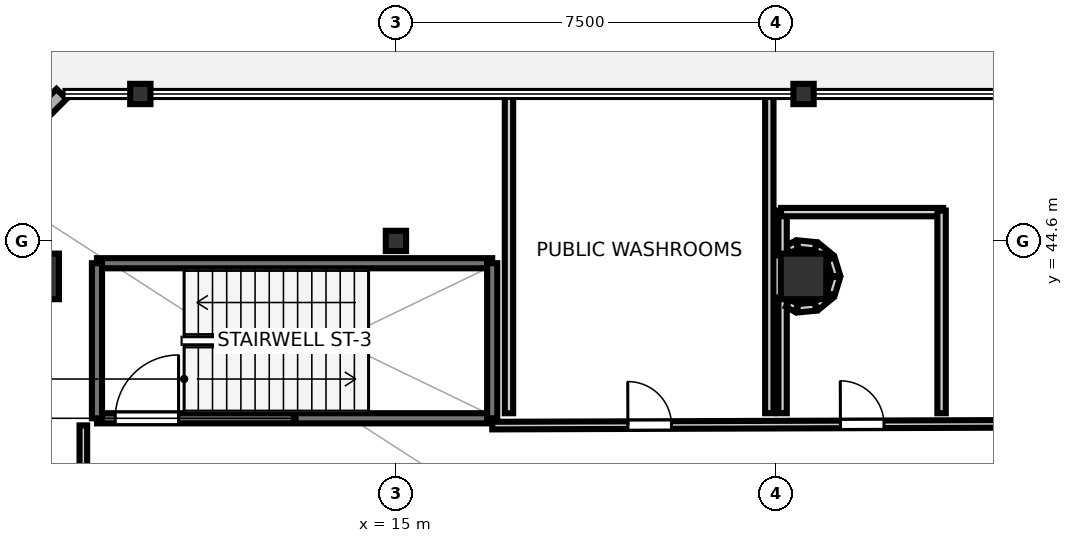
"""IFC4 building model, lengths in metres.
Left out: names, types, materials, properties, quantities, classifications, styles, units other than length and angle.
Written with IfcOpenShell. Run it as: python <this file> out.ifc"""

import sys

from ifc_helpers import new_model, si_unit, direction, frame, frame_2d, origin, origin_2d, place, context, subcontext, project, spatial, rectangle, i_section, extrude, element, fill, save


model = new_model("IFC4")
c1 = context("Model", 3, precision=1e-05, world=origin(), true_north=direction((0.0, 1.0)))
c2 = subcontext(c1, "Body", "Model", "MODEL_VIEW")
j1 = project(units=[si_unit("LENGTHUNIT", "METRE"), si_unit("PLANEANGLEUNIT", "RADIAN")], contexts=[c1])
p1 = place(None, origin())
s1 = spatial("IfcSite", under=j1, at=p1, CompositionType="ELEMENT")
p2 = place(p1, origin())
s2 = spatial("IfcBuilding", under=s1, at=p2, CompositionType="ELEMENT")
p3 = place(p2, frame((0.0, 0.0, 15.8)))
s3 = spatial("IfcBuildingStorey", under=s2, at=p3, CompositionType="ELEMENT", Elevation=15.8)
for number, where, z_axis, x_axis in (
    (1, (7.9, 43.9, 0.0), (0.0, 0.0, 1.0), (1.0, 0.0, 0.0)),
    (2, (23.045, 43.9, 0.0), (0.0, 0.0, 1.0), (1.0, 0.0, 0.0)),
):
    element("IfcColumn", number, at=place(p3, frame(where, z_axis=z_axis, x_axis=x_axis)), inside=s3, PredefinedType="COLUMN", context=c2, shape_type="SweptSolid", body=[
        extrude(rectangle(XDim=0.9, YDim=0.9, at=origin_2d()), origin(), (0.0, 0.0, 1.0), 4.8),
    ])
p4 = place(p3, frame((15.0, 44.6, 0.0), z_axis=(0.0, 0.0, 1.0), x_axis=(1.0, 0.0, 0.0)))
e3 = element("IfcColumn", 3, at=p4, inside=s3, PredefinedType="COLUMN", context=c2, shape_type="SweptSolid", body=[
    extrude(i_section(OverallWidth=0.4, OverallDepth=0.4, WebThickness=0.013, FlangeThickness=0.021, at=origin_2d()), origin(), (0.0, 0.0, 1.0), 4.8),
])
for number, where, z_axis, x_axis in (
    (4, (9.955, 47.5, -0.27), (0.0, 0.0, 1.0), (1.0, 0.0, 0.0)),
    (5, (23.045, 47.5, -0.27), (0.0, 0.0, 1.0), (1.0, 0.0, 0.0)),
):
    element("IfcColumn", number, at=place(p3, frame(where, z_axis=z_axis, x_axis=x_axis)), inside=s3, PredefinedType="COLUMN", context=c2, shape_type="SweptSolid", body=[
        extrude(i_section(OverallWidth=0.4, OverallDepth=0.4, WebThickness=0.013, FlangeThickness=0.021, at=origin_2d()), origin(), (0.0, 0.0, 1.0), 5.07),
    ])
p5 = place(p3, frame((8.4, 47.5, 0.0), z_axis=(0.0, 0.0, 1.0), x_axis=(-0.707106781187, -0.707106781187, 0.0)))
e6 = element("IfcWall", 6, at=p5, inside=s3, PredefinedType="SOLIDWALL", context=c2, shape_type="SweptSolid", body=[
    extrude(rectangle(XDim=5.94, YDim=0.28, at=frame_2d((2.97, 0.0))), origin(), (0.0, 0.0, 1.0), 4.5),
])
p6 = place(p5, frame((2.07, 0.0, 0.0)))
e7 = element("IfcOpeningElement", 7, at=p6, cuts=e6, PredefinedType="OPENING", context=c2, shape_type="SweptSolid", body=[
    extrude(rectangle(XDim=1.8, YDim=2.2, at=frame_2d((0.9, 1.1))), frame((0.0, 0.15, 0.0), z_axis=(0.0, -1.0, 0.0), x_axis=(1.0, 0.0, 0.0)), (0.0, 0.0, 1.0), 0.3),
])
p7 = place(p3, frame((9.1, 41.1, 0.0), z_axis=(0.0, 0.0, 1.0), x_axis=(1.0, 0.0, 0.0)))
e8 = element("IfcWall", 8, at=p7, inside=s3, PredefinedType="SOLIDWALL", context=c2, shape_type="SweptSolid", body=[
    extrude(rectangle(XDim=7.8, YDim=0.2, at=frame_2d((3.9, 0.0))), origin(), (0.0, 0.0, 1.0), 4.5),
])
p8 = place(p7, frame((0.36, 0.0, 0.0)))
e9 = element("IfcOpeningElement", 9, at=p8, cuts=e8, PredefinedType="OPENING", context=c2, shape_type="SweptSolid", body=[
    extrude(rectangle(XDim=1.25, YDim=2.15, at=frame_2d((0.625, 1.075))), frame((0.0, 0.11, 0.0), z_axis=(0.0, -1.0, 0.0), x_axis=(1.0, 0.0, 0.0)), (0.0, 0.0, 1.0), 0.22),
])
p9 = place(p3, frame((9.1, 44.16, 0.0), z_axis=(0.0, 0.0, 1.0), x_axis=(1.0, 0.0, 0.0)))
e10 = element("IfcWall", 10, at=p9, inside=s3, PredefinedType="SOLIDWALL", context=c2, shape_type="SweptSolid", body=[
    extrude(rectangle(XDim=7.8, YDim=0.2, at=frame_2d((3.9, 0.0))), origin(), (0.0, 0.0, 1.0), 4.5),
])
for number, where, z_axis, x_axis in (
    (11, (9.1, 41.1, 0.0), (0.0, 0.0, 1.0), (0.0, 1.0, 0.0)),
    (12, (16.9, 41.1, 0.0), (0.0, 0.0, 1.0), (0.0, 1.0, 0.0)),
):
    element("IfcWall", number, at=place(p3, frame(where, z_axis=z_axis, x_axis=x_axis)), inside=s3, PredefinedType="SOLIDWALL", context=c2, shape_type="SweptSolid", body=[
        extrude(rectangle(XDim=3.06, YDim=0.2, at=frame_2d((1.53, 0.0))), origin(), (0.0, 0.0, 1.0), 4.5),
    ])
p10 = place(p3, frame((8.831, 37.8, 0.0), z_axis=(0.0, 0.0, 1.0), x_axis=(0.0, 1.0, 0.0)))
e13 = element("IfcWall", 13, at=p10, inside=s3, PredefinedType="PARTITIONING", context=c2, shape_type="SweptSolid", body=[
    extrude(rectangle(XDim=3.16, YDim=0.15, at=frame_2d((1.58, 0.0))), origin(), (0.0, 0.0, 1.0), 3.02),
])
p11 = place(p3, frame((16.9, 40.956, 0.0), z_axis=(0.0, 0.0, 1.0), x_axis=(0.999994432489, 0.003336913407, 0.0)))
e14 = element("IfcWall", 14, at=p11, inside=s3, PredefinedType="PARTITIONING", context=c2, shape_type="SweptSolid", body=[
    extrude(rectangle(XDim=9.95, YDim=0.15, at=frame_2d((4.975, 0.0))), origin(), (0.0, 0.0, 1.0), 3.02),
])
p12 = place(p11, frame((6.873, 0.0, 0.0)))
e15 = element("IfcOpeningElement", 15, at=p12, cuts=e14, PredefinedType="OPENING", context=c2, shape_type="SweptSolid", body=[
    extrude(rectangle(XDim=0.86, YDim=2.05, at=frame_2d((0.43, 1.025))), frame((0.0, 0.085, 0.0), z_axis=(0.0, -1.0, 0.0), x_axis=(1.0, 0.0, 0.0)), (0.0, 0.0, 1.0), 0.17),
])
p13 = place(p11, frame((2.678, 0.0, 0.0)))
e16 = element("IfcOpeningElement", 16, at=p13, cuts=e14, PredefinedType="OPENING", context=c2, shape_type="SweptSolid", body=[
    extrude(rectangle(XDim=0.86, YDim=2.05, at=frame_2d((0.43, 1.025))), frame((0.0, 0.085, 0.0), z_axis=(0.0, -1.0, 0.0), x_axis=(1.0, 0.0, 0.0)), (0.0, 0.0, 1.0), 0.17),
])
p14 = place(p3, frame((22.631, 41.2, 0.0), z_axis=(0.0, 0.0, 1.0), x_axis=(0.0, 1.0, 0.0)))
e17 = element("IfcWall", 17, at=p14, inside=s3, PredefinedType="PLUMBINGWALL", context=c2, shape_type="SweptSolid", body=[
    extrude(rectangle(XDim=2.285, YDim=0.165, at=frame_2d((1.143, 0.0))), origin(), (0.0, 0.0, 1.0), 3.02),
])
p15 = place(p3, frame((22.739, 43.371, 0.0), z_axis=(0.0, 0.0, 1.0), x_axis=(0.871509219389, -0.490379119172, 0.0)))
e18 = element("IfcWall", 18, at=p15, inside=s3, PredefinedType="PLUMBINGWALL", context=c2, shape_type="SweptSolid", body=[
    extrude(rectangle(XDim=0.197, YDim=0.165, at=frame_2d((0.098, 0.0))), origin(), (0.0, 0.0, 1.0), 3.02),
])
p16 = place(p3, frame((22.929, 43.271, 0.0), z_axis=(0.0, 0.0, 1.0), x_axis=(0.995193004206, 0.097933060705, 0.0)))
e19 = element("IfcWall", 19, at=p16, inside=s3, PredefinedType="PLUMBINGWALL", context=c2, shape_type="SweptSolid", body=[
    extrude(rectangle(XDim=0.354, YDim=0.165, at=frame_2d((0.177, 0.0))), origin(), (0.0, 0.0, 1.0), 3.02),
])
for number, where, z_axis, x_axis in (
    (20, (23.298, 43.312, 0.0), (0.0, 0.0, 1.0), (0.773, 0.634, 0.0)),
    (21, (23.582, 43.552, 0.0), (0.0, 0.0, 1.0), (0.29, 0.957, 0.0)),
):
    element("IfcWall", number, at=place(p3, frame(where, z_axis=z_axis, x_axis=x_axis)), inside=s3, PredefinedType="PLUMBINGWALL", context=c2, shape_type="SweptSolid", body=[
        extrude(rectangle(XDim=0.354, YDim=0.165, at=frame_2d((0.177, 0.0))), origin(), (0.0, 0.0, 1.0), 3.02),
    ])
p17 = place(p3, frame((23.684, 43.909, 0.0), z_axis=(0.0, 0.0, 1.0), x_axis=(-0.290256142171, 0.956948991291, 0.0)))
e22 = element("IfcWall", 22, at=p17, inside=s3, PredefinedType="PLUMBINGWALL", context=c2, shape_type="SweptSolid", body=[
    extrude(rectangle(XDim=0.354, YDim=0.165, at=frame_2d((0.177, 0.0))), origin(), (0.0, 0.0, 1.0), 3.02),
])
p18 = place(p3, frame((23.572, 44.263, 0.0), z_axis=(0.0, 0.0, 1.0), x_axis=(-0.773281307259, 0.634063103992, 0.0)))
e23 = element("IfcWall", 23, at=p18, inside=s3, PredefinedType="PLUMBINGWALL", context=c2, shape_type="SweptSolid", body=[
    extrude(rectangle(XDim=0.354, YDim=0.165, at=frame_2d((0.177, 0.0))), origin(), (0.0, 0.0, 1.0), 3.02),
])
p19 = place(p3, frame((23.281, 44.494, 0.0), z_axis=(0.0, 0.0, 1.0), x_axis=(-0.995193004206, 0.097933060705, 0.0)))
e24 = element("IfcWall", 24, at=p19, inside=s3, PredefinedType="PLUMBINGWALL", context=c2, shape_type="SweptSolid", body=[
    extrude(rectangle(XDim=0.354, YDim=0.165, at=frame_2d((0.177, 0.0))), origin(), (0.0, 0.0, 1.0), 3.02),
])
p20 = place(p3, frame((22.91, 44.525, 0.0), z_axis=(0.0, 0.0, 1.0), x_axis=(-0.871509219389, -0.490379119172, 0.0)))
e25 = element("IfcWall", 25, at=p20, inside=s3, PredefinedType="PLUMBINGWALL", context=c2, shape_type="SweptSolid", body=[
    extrude(rectangle(XDim=0.197, YDim=0.165, at=frame_2d((0.098, 0.0))), origin(), (0.0, 0.0, 1.0), 3.02),
])
p21 = place(p3, frame((22.631, 44.315, 0.0), z_axis=(0.0, 0.0, 1.0), x_axis=(0.0, 1.0, 0.0)))
e26 = element("IfcWall", 26, at=p21, inside=s3, PredefinedType="PLUMBINGWALL", context=c2, shape_type="SweptSolid", body=[
    extrude(rectangle(XDim=0.885, YDim=0.165, at=frame_2d((0.442, 0.0))), origin(), (0.0, 0.0, 1.0), 3.02),
])
p22 = place(p3, frame((22.6, 45.169, 0.0), z_axis=(0.0, 0.0, 1.0), x_axis=(1.0, 0.0, 0.0)))
e27 = element("IfcWall", 27, at=p22, inside=s3, PredefinedType="PLUMBINGWALL", context=c2, shape_type="SweptSolid", body=[
    extrude(rectangle(XDim=3.2, YDim=0.165, at=frame_2d((1.6, 0.0))), origin(), (0.0, 0.0, 1.0), 3.02),
])
p23 = place(p3, frame((25.769, 45.2, 0.0), z_axis=(0.0, 0.0, 1.0), x_axis=(0.0, -1.0, 0.0)))
e28 = element("IfcWall", 28, at=p23, inside=s3, PredefinedType="PLUMBINGWALL", context=c2, shape_type="SweptSolid", body=[
    extrude(rectangle(XDim=4.0, YDim=0.165, at=frame_2d((2.0, 0.0))), origin(), (0.0, 0.0, 1.0), 3.02),
])
for number, where, z_axis, x_axis in (
    (29, (22.369, 47.52, 0.0), (0.0, 0.0, 1.0), (0.0, -1.0, 0.0)),
    (30, (17.231, 41.2, 0.0), (0.0, 0.0, 1.0), (0.0, 1.0, 0.0)),
):
    element("IfcWall", number, at=place(p3, frame(where, z_axis=z_axis, x_axis=x_axis)), inside=s3, PredefinedType="PLUMBINGWALL", context=c2, shape_type="SweptSolid", body=[
        extrude(rectangle(XDim=6.32, YDim=0.165, at=frame_2d((3.16, 0.0))), origin(), (0.0, 0.0, 1.0), 3.02),
    ])
p24 = place(p8, origin())
e31 = element("IfcDoor", 31, at=p24, inside=s3, OperationType="SINGLE_SWING_RIGHT", PredefinedType="DOOR", context=c2, shape_type="SweptSolid", body=[
    extrude(rectangle(XDim=1.25, YDim=2.15, at=frame_2d((0.625, 1.075))), frame((0.0, 0.025, 0.0), z_axis=(0.0, -1.0, 0.0), x_axis=(1.0, 0.0, 0.0)), (0.0, 0.0, 1.0), 0.05),
])
fill(e9, e31)
p25 = place(p12, origin())
e32 = element("IfcDoor", 32, at=p25, inside=s3, OperationType="SINGLE_SWING_LEFT", PredefinedType="DOOR", context=c2, shape_type="SweptSolid", body=[
    extrude(rectangle(XDim=0.86, YDim=2.05, at=frame_2d((0.43, 1.025))), frame((0.0, 0.025, 0.0), z_axis=(0.0, -1.0, 0.0), x_axis=(1.0, 0.0, 0.0)), (0.0, 0.0, 1.0), 0.05),
])
fill(e15, e32)
p26 = place(p13, origin())
e33 = element("IfcDoor", 33, at=p26, inside=s3, OperationType="SINGLE_SWING_LEFT", PredefinedType="DOOR", context=c2, shape_type="SweptSolid", body=[
    extrude(rectangle(XDim=0.86, YDim=2.05, at=frame_2d((0.43, 1.025))), frame((0.0, 0.025, 0.0), z_axis=(0.0, -1.0, 0.0), x_axis=(1.0, 0.0, 0.0)), (0.0, 0.0, 1.0), 0.05),
])
fill(e16, e33)
save(model, sys.argv[1])
